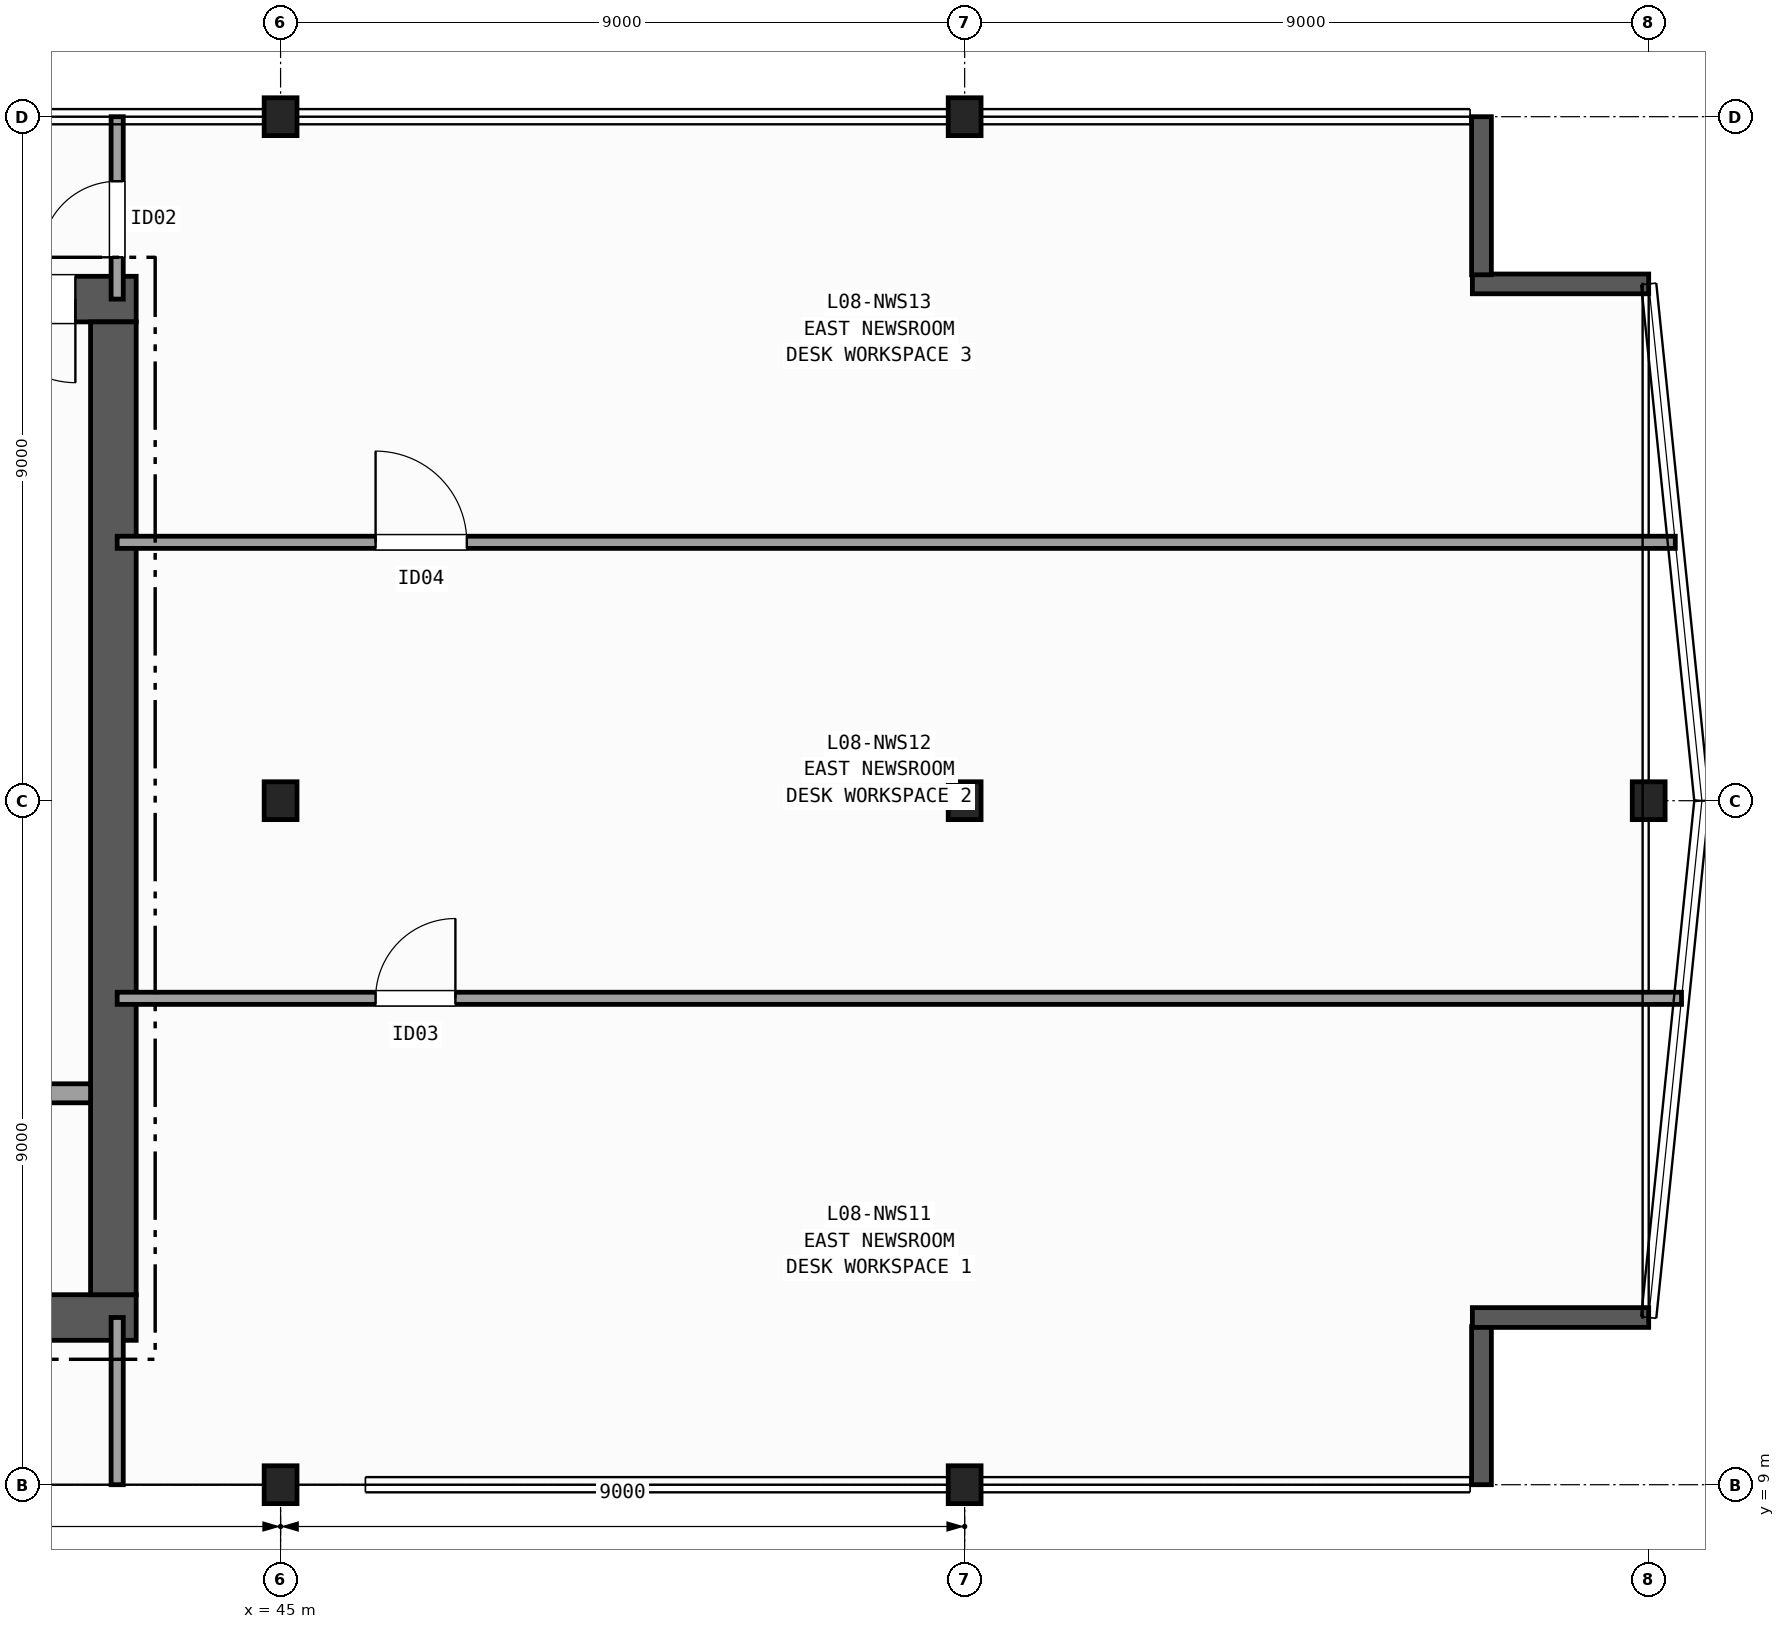
"""IFC4 building model, lengths in metres.
Left out: names, types, materials, properties, quantities, classifications, styles, units other than length and angle.
Written with IfcOpenShell. Run it as: python <this file> out.ifc"""

import sys

from ifc_helpers import new_model, si_unit, direction, frame, frame_2d, origin, origin_2d, place, context, subcontext, project, spatial, rectangle, i_section, extrude, element, fill, save


model = new_model("IFC4")
c1 = context("Model", 3, precision=1e-05, world=origin(), true_north=direction((0.0, 1.0)))
c2 = subcontext(c1, "Body", "Model", "MODEL_VIEW")
j1 = project(units=[si_unit("LENGTHUNIT", "METRE"), si_unit("PLANEANGLEUNIT", "RADIAN")], contexts=[c1])
p1 = place(None, origin())
s1 = spatial("IfcSite", under=j1, at=p1, CompositionType="ELEMENT")
p2 = place(p1, origin())
s2 = spatial("IfcBuilding", under=s1, at=p2, CompositionType="ELEMENT")
p3 = place(p2, frame((0.0, 0.0, 39.7)))
s3 = spatial("IfcBuildingStorey", under=s2, at=p3, CompositionType="ELEMENT", Elevation=39.7)
for number, where, z_axis, x_axis in (
    (1, (45.0, 9.0, 0.0), (0.0, 0.0, 1.0), (1.0, 0.0, 0.0)),
    (2, (45.0, 18.0, 0.0), (0.0, 0.0, 1.0), (1.0, 0.0, 0.0)),
    (3, (45.0, 27.0, 0.0), (0.0, 0.0, 1.0), (1.0, 0.0, 0.0)),
    (4, (54.0, 9.0, 0.0), (0.0, 0.0, 1.0), (1.0, 0.0, 0.0)),
    (5, (54.0, 18.0, 0.0), (0.0, 0.0, 1.0), (1.0, 0.0, 0.0)),
    (6, (54.0, 27.0, 0.0), (0.0, 0.0, 1.0), (1.0, 0.0, 0.0)),
    (7, (63.0, 18.0, 0.0), (0.0, 0.0, 1.0), (1.0, 0.0, 0.0)),
):
    element("IfcColumn", number, at=place(p3, frame(where, z_axis=z_axis, x_axis=x_axis)), inside=s3, PredefinedType="COLUMN", context=c2, shape_type="SweptSolid", body=[
        extrude(i_section(OverallWidth=0.432, OverallDepth=0.498, WebThickness=0.056, FlangeThickness=0.089, FilletRadius=0.015, at=origin_2d()), origin(), (0.0, 0.0, 1.0), 3.7),
    ])
p4 = place(p3, frame((60.8, 9.0, 0.0), z_axis=(0.0, 0.0, 1.0), x_axis=(0.0, 1.0, 0.0)))
e8 = element("IfcWall", 8, at=p4, inside=s3, PredefinedType="SOLIDWALL", context=c2, shape_type="SweptSolid", body=[
    extrude(rectangle(XDim=2.08, YDim=0.26, at=frame_2d((1.04, 0.0))), origin(), (0.0, 0.0, 1.0), 3.42),
])
for number, where, z_axis, x_axis in (
    (9, (60.68, 11.2, 0.0), (0.0, 0.0, 1.0), (1.0, 0.0, 0.0)),
    (10, (63.0, 24.8, 0.0), (0.0, 0.0, 1.0), (-1.0, 0.0, 0.0)),
):
    element("IfcWall", number, at=place(p3, frame(where, z_axis=z_axis, x_axis=x_axis)), inside=s3, PredefinedType="SOLIDWALL", context=c2, shape_type="SweptSolid", body=[
        extrude(rectangle(XDim=2.32, YDim=0.26, at=frame_2d((1.16, 0.0))), origin(), (0.0, 0.0, 1.0), 3.42),
    ])
p5 = place(p3, frame((60.8, 24.92, 0.0), z_axis=(0.0, 0.0, 1.0), x_axis=(0.0, 1.0, 0.0)))
e11 = element("IfcWall", 11, at=p5, inside=s3, PredefinedType="SOLIDWALL", context=c2, shape_type="SweptSolid", body=[
    extrude(rectangle(XDim=2.08, YDim=0.26, at=frame_2d((1.04, 0.0))), origin(), (0.0, 0.0, 1.0), 3.42),
])
p6 = place(p3, frame((29.1, 11.2, 0.0), z_axis=(0.0, 0.0, 1.0), x_axis=(1.0, 0.0, 0.0)))
e12 = element("IfcWall", 12, at=p6, inside=s3, PredefinedType="SHEAR", context=c2, shape_type="SweptSolid", body=[
    extrude(rectangle(XDim=14.0, YDim=0.6, at=frame_2d((7.0, 0.0))), origin(), (0.0, 0.0, 1.0), 3.42),
])
p7 = place(p3, frame((43.1, 24.6, 0.0), z_axis=(0.0, 0.0, 1.0), x_axis=(-1.0, 0.0, 0.0)))
e13 = element("IfcWall", 13, at=p7, inside=s3, PredefinedType="SHEAR", context=c2, shape_type="SweptSolid", body=[
    extrude(rectangle(XDim=14.0, YDim=0.6, at=frame_2d((7.0, 0.0))), origin(), (0.0, 0.0, 1.0), 3.42),
])
p8 = place(p7, frame((0.8, 0.0, 0.0)))
e14 = element("IfcOpeningElement", 14, at=p8, cuts=e13, PredefinedType="OPENING", context=c2, shape_type="SweptSolid", body=[
    extrude(rectangle(XDim=1.1, YDim=2.15, at=frame_2d((0.55, 1.075))), frame((0.0, 0.31, 0.0), z_axis=(0.0, -1.0, 0.0), x_axis=(1.0, 0.0, 0.0)), (0.0, 0.0, 1.0), 0.62),
])
p9 = place(p7, frame((2.3, 0.0, 0.0)))
e15 = element("IfcOpeningElement", 15, at=p9, cuts=e13, PredefinedType="OPENING", context=c2, shape_type="SweptSolid", body=[
    extrude(rectangle(XDim=0.9, YDim=2.1, at=frame_2d((0.45, 1.05))), frame((0.0, 0.31, 0.0), z_axis=(0.0, -1.0, 0.0), x_axis=(1.0, 0.0, 0.0)), (0.0, 0.0, 1.0), 0.62),
])
p10 = place(p7, frame((3.6, 0.0, 0.0)))
e16 = element("IfcOpeningElement", 16, at=p10, cuts=e13, PredefinedType="OPENING", context=c2, shape_type="SweptSolid", body=[
    extrude(rectangle(XDim=0.9, YDim=2.1, at=frame_2d((0.45, 1.05))), frame((0.0, 0.31, 0.0), z_axis=(0.0, -1.0, 0.0), x_axis=(1.0, 0.0, 0.0)), (0.0, 0.0, 1.0), 0.62),
])
p11 = place(p7, frame((4.95, 0.0, 0.0)))
e17 = element("IfcOpeningElement", 17, at=p11, cuts=e13, PredefinedType="OPENING", context=c2, shape_type="SweptSolid", body=[
    extrude(rectangle(XDim=0.9, YDim=2.1, at=frame_2d((0.45, 1.05))), frame((0.0, 0.31, 0.0), z_axis=(0.0, -1.0, 0.0), x_axis=(1.0, 0.0, 0.0)), (0.0, 0.0, 1.0), 0.62),
])
p12 = place(p3, frame((42.8, 11.5, 0.0), z_axis=(0.0, 0.0, 1.0), x_axis=(0.0, 1.0, 0.0)))
e18 = element("IfcWall", 18, at=p12, inside=s3, PredefinedType="SHEAR", context=c2, shape_type="SweptSolid", body=[
    extrude(rectangle(XDim=12.8, YDim=0.6, at=frame_2d((6.4, 0.0))), origin(), (0.0, 0.0, 1.0), 3.42),
])
p13 = place(p3, frame((33.07, 14.15, 0.0), z_axis=(0.0, 0.0, 1.0), x_axis=(1.0, 0.0, 0.0)))
e19 = element("IfcWall", 19, at=p13, inside=s3, PredefinedType="PARTITIONING", context=c2, shape_type="SweptSolid", body=[
    extrude(rectangle(XDim=9.43, YDim=0.25, at=frame_2d((4.715, 0.0))), origin(), (0.0, 0.0, 1.0), 3.42),
])
p14 = place(p13, frame((0.755, 0.0, 0.0)))
e20 = element("IfcOpeningElement", 20, at=p14, cuts=e19, PredefinedType="OPENING", context=c2, shape_type="SweptSolid", body=[
    extrude(rectangle(XDim=1.15, YDim=2.15, at=frame_2d((0.575, 1.075))), frame((0.0, 0.135, 0.0), z_axis=(0.0, -1.0, 0.0), x_axis=(1.0, 0.0, 0.0)), (0.0, 0.0, 1.0), 0.27),
])
p15 = place(p13, frame((3.355, 0.0, 0.0)))
e21 = element("IfcOpeningElement", 21, at=p15, cuts=e19, PredefinedType="OPENING", context=c2, shape_type="SweptSolid", body=[
    extrude(rectangle(XDim=1.15, YDim=2.15, at=frame_2d((0.575, 1.075))), frame((0.0, 0.135, 0.0), z_axis=(0.0, -1.0, 0.0), x_axis=(1.0, 0.0, 0.0)), (0.0, 0.0, 1.0), 0.27),
])
p16 = place(p3, frame((42.85, 9.0, 0.0), z_axis=(0.0, 0.0, 1.0), x_axis=(0.0, 1.0, 0.0)))
e22 = element("IfcWall", 22, at=p16, inside=s3, PredefinedType="PARTITIONING", context=c2, shape_type="SweptSolid", body=[
    extrude(rectangle(XDim=2.2, YDim=0.16, at=frame_2d((1.1, 0.0))), origin(), (0.0, 0.0, 1.0), 2.627),
])
p17 = place(p3, frame((42.85, 24.6, 0.0), z_axis=(0.0, 0.0, 1.0), x_axis=(0.0, 1.0, 0.0)))
e23 = element("IfcWall", 23, at=p17, inside=s3, PredefinedType="PARTITIONING", context=c2, shape_type="SweptSolid", body=[
    extrude(rectangle(XDim=2.4, YDim=0.16, at=frame_2d((1.2, 0.0))), origin(), (0.0, 0.0, 1.0), 2.627),
])
p18 = place(p17, frame((0.55, 0.0, 0.0)))
e24 = element("IfcOpeningElement", 24, at=p18, cuts=e23, PredefinedType="OPENING", context=c2, shape_type="SweptSolid", body=[
    extrude(rectangle(XDim=1.0, YDim=2.1, at=frame_2d((0.5, 1.05))), frame((0.0, 0.09, 0.0), z_axis=(0.0, -1.0, 0.0), x_axis=(1.0, 0.0, 0.0)), (0.0, 0.0, 1.0), 0.18),
])
p19 = place(p3, frame((42.85, 15.4, 0.0), z_axis=(0.0, 0.0, 1.0), x_axis=(1.0, 0.0, 0.0)))
e25 = element("IfcWall", 25, at=p19, inside=s3, PredefinedType="PARTITIONING", context=c2, shape_type="SweptSolid", body=[
    extrude(rectangle(XDim=20.582, YDim=0.16, at=frame_2d((10.291, 0.0))), origin(), (0.0, 0.0, 1.0), 3.42),
])
p20 = place(p19, frame((3.4, 0.0, 0.0)))
e26 = element("IfcOpeningElement", 26, at=p20, cuts=e25, PredefinedType="OPENING", context=c2, shape_type="SweptSolid", body=[
    extrude(rectangle(XDim=1.05, YDim=2.15, at=frame_2d((0.525, 1.075))), frame((0.0, 0.09, 0.0), z_axis=(0.0, -1.0, 0.0), x_axis=(1.0, 0.0, 0.0)), (0.0, 0.0, 1.0), 0.18),
])
p21 = place(p3, frame((42.85, 21.4, 0.0), z_axis=(0.0, 0.0, 1.0), x_axis=(1.0, 0.0, 0.0)))
e27 = element("IfcWall", 27, at=p21, inside=s3, PredefinedType="PARTITIONING", context=c2, shape_type="SweptSolid", body=[
    extrude(rectangle(XDim=20.5, YDim=0.16, at=frame_2d((10.25, 0.0))), origin(), (0.0, 0.0, 1.0), 3.42),
])
p22 = place(p21, frame((3.4, 0.0, 0.0)))
e28 = element("IfcOpeningElement", 28, at=p22, cuts=e27, PredefinedType="OPENING", context=c2, shape_type="SweptSolid", body=[
    extrude(rectangle(XDim=1.2, YDim=2.15, at=frame_2d((0.6, 1.075))), frame((0.0, 0.09, 0.0), z_axis=(0.0, -1.0, 0.0), x_axis=(1.0, 0.0, 0.0)), (0.0, 0.0, 1.0), 0.18),
])
p23 = place(p8, origin())
e29 = element("IfcDoor", 29, at=p23, inside=s3, OperationType="SINGLE_SWING_LEFT", PredefinedType="DOOR", context=c2, shape_type="SweptSolid", body=[
    extrude(rectangle(XDim=1.1, YDim=2.15, at=frame_2d((0.55, 1.075))), frame((0.0, 0.025, 0.0), z_axis=(0.0, -1.0, 0.0), x_axis=(1.0, 0.0, 0.0)), (0.0, 0.0, 1.0), 0.05),
])
fill(e14, e29)
p24 = place(p18, origin())
e30 = element("IfcDoor", 30, at=p24, inside=s3, OperationType="SINGLE_SWING_LEFT", PredefinedType="DOOR", context=c2, shape_type="SweptSolid", body=[
    extrude(rectangle(XDim=1.0, YDim=2.1, at=frame_2d((0.5, 1.05))), frame((0.0, 0.025, 0.0), z_axis=(0.0, -1.0, 0.0), x_axis=(1.0, 0.0, 0.0)), (0.0, 0.0, 1.0), 0.05),
])
fill(e24, e30)
p25 = place(p20, origin())
e31 = element("IfcDoor", 31, at=p25, inside=s3, OperationType="SINGLE_SWING_RIGHT", PredefinedType="DOOR", context=c2, shape_type="SweptSolid", body=[
    extrude(rectangle(XDim=1.05, YDim=2.15, at=frame_2d((0.525, 1.075))), frame((0.0, 0.025, 0.0), z_axis=(0.0, -1.0, 0.0), x_axis=(1.0, 0.0, 0.0)), (0.0, 0.0, 1.0), 0.05),
])
fill(e26, e31)
p26 = place(p22, origin())
e32 = element("IfcDoor", 32, at=p26, inside=s3, OperationType="SINGLE_SWING_LEFT", PredefinedType="DOOR", context=c2, shape_type="SweptSolid", body=[
    extrude(rectangle(XDim=1.2, YDim=2.15, at=frame_2d((0.6, 1.075))), frame((0.0, 0.025, 0.0), z_axis=(0.0, -1.0, 0.0), x_axis=(1.0, 0.0, 0.0)), (0.0, 0.0, 1.0), 0.05),
])
fill(e28, e32)
save(model, sys.argv[1])
